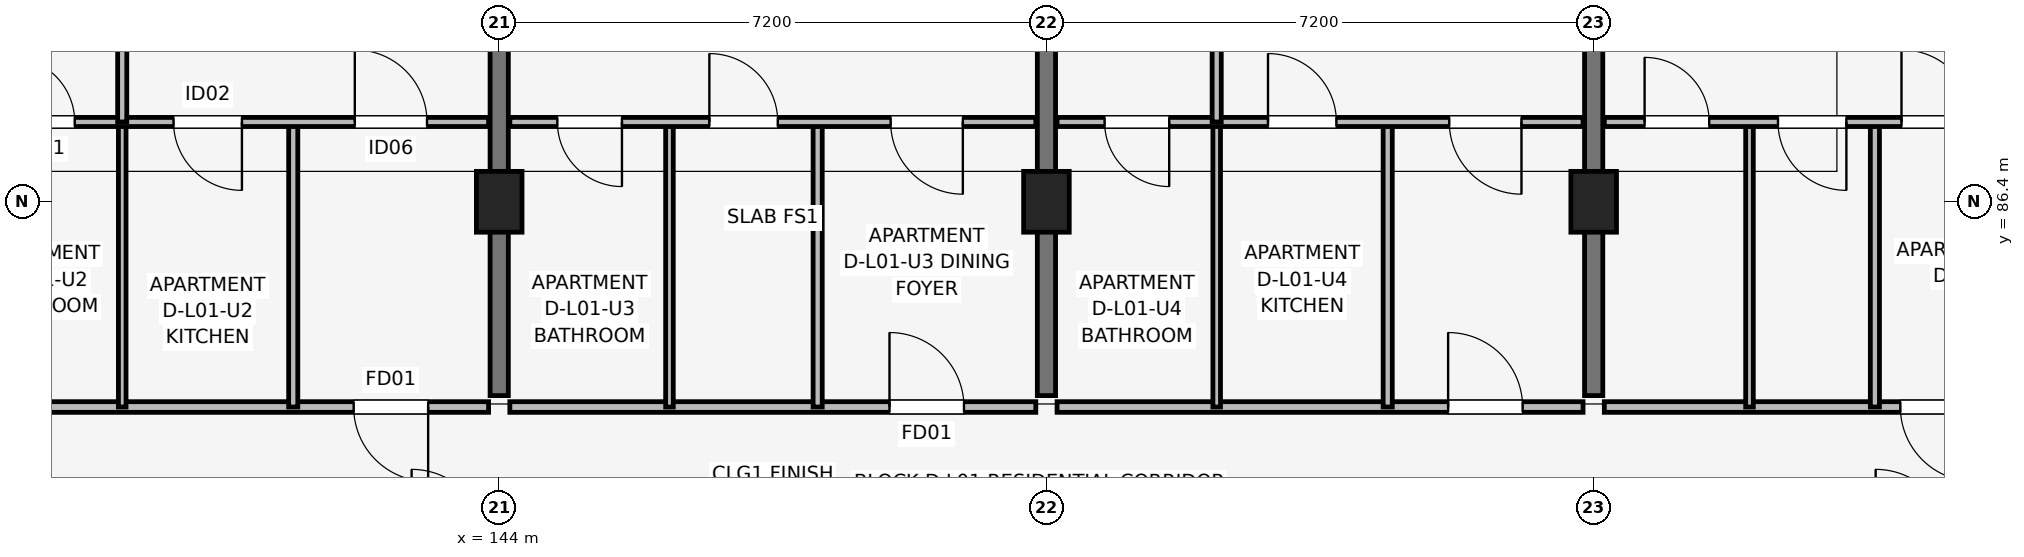
"""IFC4 building model, lengths in metres.
Left out: names, types, materials, properties, quantities, classifications, styles, units other than length and angle.
Written with IfcOpenShell. Run it as: python <this file> out.ifc"""

import sys

from ifc_helpers import new_model, si_unit, direction, frame, frame_2d, origin, origin_2d, place, context, subcontext, project, spatial, rectangle, extrude, element, fill, save


model = new_model("IFC4")
c1 = context("Model", 3, precision=1e-05, world=origin(), true_north=direction((0.0, 1.0)))
c2 = subcontext(c1, "Body", "Model", "MODEL_VIEW")
j1 = project(units=[si_unit("LENGTHUNIT", "METRE"), si_unit("PLANEANGLEUNIT", "RADIAN")], contexts=[c1])
p1 = place(None, origin())
s1 = spatial("IfcSite", under=j1, at=p1, CompositionType="ELEMENT")
p2 = place(p1, origin())
s2 = spatial("IfcBuilding", under=s1, at=p2, CompositionType="ELEMENT")
p3 = place(p2, frame((0.0, 0.0, 4.5)))
s3 = spatial("IfcBuildingStorey", under=s2, at=p3, CompositionType="ELEMENT", Elevation=4.5)
for number, where, z_axis, x_axis in (
    (1, (144.0, 86.4, 0.0), (0.0, 0.0, 1.0), (1.0, 0.0, 0.0)),
    (2, (151.2, 86.4, 0.0), (0.0, 0.0, 1.0), (1.0, 0.0, 0.0)),
    (3, (158.4, 86.4, 0.0), (0.0, 0.0, 1.0), (1.0, 0.0, 0.0)),
):
    element("IfcColumn", number, at=place(p3, frame(where, z_axis=z_axis, x_axis=x_axis)), inside=s3, PredefinedType="COLUMN", context=c2, shape_type="SweptSolid", body=[
        extrude(rectangle(XDim=0.6, YDim=0.8, at=origin_2d()), origin(), (0.0, 0.0, 1.0), 4.2),
    ])
for number, where, z_axis, x_axis in (
    (4, (144.0, 83.85, 0.0), (0.0, 0.0, 1.0), (0.0, 1.0, 0.0)),
    (5, (151.2, 83.85, 0.0), (0.0, 0.0, 1.0), (0.0, 1.0, 0.0)),
    (6, (158.4, 83.85, 0.0), (0.0, 0.0, 1.0), (0.0, 1.0, 0.0)),
):
    element("IfcWall", number, at=place(p3, frame(where, z_axis=z_axis, x_axis=x_axis)), inside=s3, PredefinedType="SHEAR", context=c2, shape_type="SweptSolid", body=[
        extrude(rectangle(XDim=9.4, YDim=0.24, at=frame_2d((4.7, 0.0))), origin(), (0.0, 0.0, 1.0), 4.2),
    ])
p4 = place(p3, frame((136.94, 83.7, 0.0), z_axis=(0.0, 0.0, 1.0), x_axis=(1.0, 0.0, 0.0)))
e7 = element("IfcWall", 7, at=p4, inside=s3, PredefinedType="PARTITIONING", context=c2, shape_type="SweptSolid", body=[
    extrude(rectangle(XDim=6.92, YDim=0.14, at=frame_2d((3.46, 0.0))), origin(), (0.0, 0.0, 1.0), 3.25),
])
p5 = place(p4, frame((6.125, 0.0, 0.0), z_axis=(0.0, 0.0, 1.0), x_axis=(-1.0, 0.0, 0.0)))
e8 = element("IfcOpeningElement", 8, at=p5, cuts=e7, PredefinedType="OPENING", context=c2, shape_type="SweptSolid", body=[
    extrude(rectangle(XDim=0.98, YDim=2.1, at=frame_2d((0.49, 1.05))), frame((0.0, 0.08, 0.0), z_axis=(0.0, -1.0, 0.0), x_axis=(1.0, 0.0, 0.0)), (0.0, 0.0, 1.0), 0.16),
])
p6 = place(p3, frame((139.04, 83.7, 0.0), z_axis=(0.0, 0.0, 1.0), x_axis=(0.0, 1.0, 0.0)))
e9 = element("IfcWall", 9, at=p6, inside=s3, PredefinedType="PARTITIONING", context=c2, shape_type="SweptSolid", body=[
    extrude(rectangle(XDim=3.75, YDim=0.1, at=frame_2d((1.875, 0.0))), origin(), (0.0, 0.0, 1.0), 3.25),
])
p7 = place(p3, frame((141.29, 83.7, 0.0), z_axis=(0.0, 0.0, 1.0), x_axis=(0.0, 1.0, 0.0)))
e10 = element("IfcWall", 10, at=p7, inside=s3, PredefinedType="PARTITIONING", context=c2, shape_type="SweptSolid", body=[
    extrude(rectangle(XDim=3.75, YDim=0.12, at=frame_2d((1.875, 0.0))), origin(), (0.0, 0.0, 1.0), 3.25),
])
p8 = place(p3, frame((136.94, 87.45, 0.0), z_axis=(0.0, 0.0, 1.0), x_axis=(1.0, 0.0, 0.0)))
e11 = element("IfcWall", 11, at=p8, inside=s3, PredefinedType="PARTITIONING", context=c2, shape_type="SweptSolid", body=[
    extrude(rectangle(XDim=6.92, YDim=0.12, at=frame_2d((3.46, 0.0))), origin(), (0.0, 0.0, 1.0), 3.25),
])
p9 = place(p8, frame((0.625, 0.0, 0.0)))
e12 = element("IfcOpeningElement", 12, at=p9, cuts=e11, PredefinedType="OPENING", context=c2, shape_type="SweptSolid", body=[
    extrude(rectangle(XDim=0.85, YDim=2.08, at=frame_2d((0.425, 1.04))), frame((0.0, 0.07, 0.0), z_axis=(0.0, -1.0, 0.0), x_axis=(1.0, 0.0, 0.0)), (0.0, 0.0, 1.0), 0.14),
])
p10 = place(p8, frame((3.675, 0.0, 0.0), z_axis=(0.0, 0.0, 1.0), x_axis=(-1.0, 0.0, 0.0)))
e13 = element("IfcOpeningElement", 13, at=p10, cuts=e11, PredefinedType="OPENING", context=c2, shape_type="SweptSolid", body=[
    extrude(rectangle(XDim=0.9, YDim=2.08, at=frame_2d((0.45, 1.04))), frame((0.0, 0.07, 0.0), z_axis=(0.0, -1.0, 0.0), x_axis=(1.0, 0.0, 0.0)), (0.0, 0.0, 1.0), 0.14),
])
p11 = place(p8, frame((5.16, 0.0, 0.0)))
e14 = element("IfcOpeningElement", 14, at=p11, cuts=e11, PredefinedType="OPENING", context=c2, shape_type="SweptSolid", body=[
    extrude(rectangle(XDim=0.95, YDim=2.08, at=frame_2d((0.475, 1.04))), frame((0.0, 0.07, 0.0), z_axis=(0.0, -1.0, 0.0), x_axis=(1.0, 0.0, 0.0)), (0.0, 0.0, 1.0), 0.14),
])
p12 = place(p3, frame((139.04, 87.45, 0.0), z_axis=(0.0, 0.0, 1.0), x_axis=(0.0, 1.0, 0.0)))
e15 = element("IfcWall", 15, at=p12, inside=s3, PredefinedType="PARTITIONING", context=c2, shape_type="SweptSolid", body=[
    extrude(rectangle(XDim=5.85, YDim=0.12, at=frame_2d((2.925, 0.0))), origin(), (0.0, 0.0, 1.0), 3.25),
])
p13 = place(p12, frame((3.375, 0.0, 0.0), z_axis=(0.0, 0.0, 1.0), x_axis=(-1.0, 0.0, 0.0)))
e16 = element("IfcOpeningElement", 16, at=p13, cuts=e15, PredefinedType="OPENING", context=c2, shape_type="SweptSolid", body=[
    extrude(rectangle(XDim=0.9, YDim=2.08, at=frame_2d((0.45, 1.04))), frame((0.0, 0.07, 0.0), z_axis=(0.0, -1.0, 0.0), x_axis=(1.0, 0.0, 0.0)), (0.0, 0.0, 1.0), 0.14),
])
p14 = place(p3, frame((144.14, 83.7, 0.0), z_axis=(0.0, 0.0, 1.0), x_axis=(1.0, 0.0, 0.0)))
e17 = element("IfcWall", 17, at=p14, inside=s3, PredefinedType="PARTITIONING", context=c2, shape_type="SweptSolid", body=[
    extrude(rectangle(XDim=6.92, YDim=0.14, at=frame_2d((3.46, 0.0))), origin(), (0.0, 0.0, 1.0), 3.25),
])
p15 = place(p14, frame((4.995, 0.0, 0.0)))
e18 = element("IfcOpeningElement", 18, at=p15, cuts=e17, PredefinedType="OPENING", context=c2, shape_type="SweptSolid", body=[
    extrude(rectangle(XDim=0.98, YDim=2.1, at=frame_2d((0.49, 1.05))), frame((0.0, 0.08, 0.0), z_axis=(0.0, -1.0, 0.0), x_axis=(1.0, 0.0, 0.0)), (0.0, 0.0, 1.0), 0.16),
])
p16 = place(p3, frame((146.24, 83.7, 0.0), z_axis=(0.0, 0.0, 1.0), x_axis=(0.0, 1.0, 0.0)))
e19 = element("IfcWall", 19, at=p16, inside=s3, PredefinedType="PARTITIONING", context=c2, shape_type="SweptSolid", body=[
    extrude(rectangle(XDim=3.75, YDim=0.1, at=frame_2d((1.875, 0.0))), origin(), (0.0, 0.0, 1.0), 3.25),
])
p17 = place(p3, frame((148.19, 83.7, 0.0), z_axis=(0.0, 0.0, 1.0), x_axis=(0.0, 1.0, 0.0)))
e20 = element("IfcWall", 20, at=p17, inside=s3, PredefinedType="PARTITIONING", context=c2, shape_type="SweptSolid", body=[
    extrude(rectangle(XDim=3.75, YDim=0.12, at=frame_2d((1.875, 0.0))), origin(), (0.0, 0.0, 1.0), 3.25),
])
p18 = place(p3, frame((144.14, 87.45, 0.0), z_axis=(0.0, 0.0, 1.0), x_axis=(1.0, 0.0, 0.0)))
e21 = element("IfcWall", 21, at=p18, inside=s3, PredefinedType="PARTITIONING", context=c2, shape_type="SweptSolid", body=[
    extrude(rectangle(XDim=6.92, YDim=0.12, at=frame_2d((3.46, 0.0))), origin(), (0.0, 0.0, 1.0), 3.25),
])
p19 = place(p18, frame((1.475, 0.0, 0.0), z_axis=(0.0, 0.0, 1.0), x_axis=(-1.0, 0.0, 0.0)))
e22 = element("IfcOpeningElement", 22, at=p19, cuts=e21, PredefinedType="OPENING", context=c2, shape_type="SweptSolid", body=[
    extrude(rectangle(XDim=0.85, YDim=2.08, at=frame_2d((0.425, 1.04))), frame((0.0, 0.07, 0.0), z_axis=(0.0, -1.0, 0.0), x_axis=(1.0, 0.0, 0.0)), (0.0, 0.0, 1.0), 0.14),
])
p20 = place(p18, frame((2.625, 0.0, 0.0)))
e23 = element("IfcOpeningElement", 23, at=p20, cuts=e21, PredefinedType="OPENING", context=c2, shape_type="SweptSolid", body=[
    extrude(rectangle(XDim=0.9, YDim=2.08, at=frame_2d((0.45, 1.04))), frame((0.0, 0.07, 0.0), z_axis=(0.0, -1.0, 0.0), x_axis=(1.0, 0.0, 0.0)), (0.0, 0.0, 1.0), 0.14),
])
p21 = place(p18, frame((5.96, 0.0, 0.0), z_axis=(0.0, 0.0, 1.0), x_axis=(-1.0, 0.0, 0.0)))
e24 = element("IfcOpeningElement", 24, at=p21, cuts=e21, PredefinedType="OPENING", context=c2, shape_type="SweptSolid", body=[
    extrude(rectangle(XDim=0.95, YDim=2.08, at=frame_2d((0.475, 1.04))), frame((0.0, 0.07, 0.0), z_axis=(0.0, -1.0, 0.0), x_axis=(1.0, 0.0, 0.0)), (0.0, 0.0, 1.0), 0.14),
])
p22 = place(p3, frame((151.34, 83.7, 0.0), z_axis=(0.0, 0.0, 1.0), x_axis=(1.0, 0.0, 0.0)))
e25 = element("IfcWall", 25, at=p22, inside=s3, PredefinedType="PARTITIONING", context=c2, shape_type="SweptSolid", body=[
    extrude(rectangle(XDim=6.92, YDim=0.14, at=frame_2d((3.46, 0.0))), origin(), (0.0, 0.0, 1.0), 3.25),
])
p23 = place(p22, frame((5.145, 0.0, 0.0)))
e26 = element("IfcOpeningElement", 26, at=p23, cuts=e25, PredefinedType="OPENING", context=c2, shape_type="SweptSolid", body=[
    extrude(rectangle(XDim=0.98, YDim=2.1, at=frame_2d((0.49, 1.05))), frame((0.0, 0.08, 0.0), z_axis=(0.0, -1.0, 0.0), x_axis=(1.0, 0.0, 0.0)), (0.0, 0.0, 1.0), 0.16),
])
p24 = place(p3, frame((153.44, 83.7, 0.0), z_axis=(0.0, 0.0, 1.0), x_axis=(0.0, 1.0, 0.0)))
e27 = element("IfcWall", 27, at=p24, inside=s3, PredefinedType="PARTITIONING", context=c2, shape_type="SweptSolid", body=[
    extrude(rectangle(XDim=3.75, YDim=0.1, at=frame_2d((1.875, 0.0))), origin(), (0.0, 0.0, 1.0), 3.25),
])
p25 = place(p3, frame((155.69, 83.7, 0.0), z_axis=(0.0, 0.0, 1.0), x_axis=(0.0, 1.0, 0.0)))
e28 = element("IfcWall", 28, at=p25, inside=s3, PredefinedType="PARTITIONING", context=c2, shape_type="SweptSolid", body=[
    extrude(rectangle(XDim=3.75, YDim=0.12, at=frame_2d((1.875, 0.0))), origin(), (0.0, 0.0, 1.0), 3.25),
])
p26 = place(p3, frame((151.34, 87.45, 0.0), z_axis=(0.0, 0.0, 1.0), x_axis=(1.0, 0.0, 0.0)))
e29 = element("IfcWall", 29, at=p26, inside=s3, PredefinedType="PARTITIONING", context=c2, shape_type="SweptSolid", body=[
    extrude(rectangle(XDim=6.92, YDim=0.12, at=frame_2d((3.46, 0.0))), origin(), (0.0, 0.0, 1.0), 3.25),
])
p27 = place(p26, frame((1.475, 0.0, 0.0), z_axis=(0.0, 0.0, 1.0), x_axis=(-1.0, 0.0, 0.0)))
e30 = element("IfcOpeningElement", 30, at=p27, cuts=e29, PredefinedType="OPENING", context=c2, shape_type="SweptSolid", body=[
    extrude(rectangle(XDim=0.85, YDim=2.08, at=frame_2d((0.425, 1.04))), frame((0.0, 0.07, 0.0), z_axis=(0.0, -1.0, 0.0), x_axis=(1.0, 0.0, 0.0)), (0.0, 0.0, 1.0), 0.14),
])
p28 = place(p26, frame((2.775, 0.0, 0.0)))
e31 = element("IfcOpeningElement", 31, at=p28, cuts=e29, PredefinedType="OPENING", context=c2, shape_type="SweptSolid", body=[
    extrude(rectangle(XDim=0.9, YDim=2.08, at=frame_2d((0.45, 1.04))), frame((0.0, 0.07, 0.0), z_axis=(0.0, -1.0, 0.0), x_axis=(1.0, 0.0, 0.0)), (0.0, 0.0, 1.0), 0.14),
])
p29 = place(p26, frame((6.11, 0.0, 0.0), z_axis=(0.0, 0.0, 1.0), x_axis=(-1.0, 0.0, 0.0)))
e32 = element("IfcOpeningElement", 32, at=p29, cuts=e29, PredefinedType="OPENING", context=c2, shape_type="SweptSolid", body=[
    extrude(rectangle(XDim=0.95, YDim=2.08, at=frame_2d((0.475, 1.04))), frame((0.0, 0.07, 0.0), z_axis=(0.0, -1.0, 0.0), x_axis=(1.0, 0.0, 0.0)), (0.0, 0.0, 1.0), 0.14),
])
p30 = place(p3, frame((153.44, 87.45, 0.0), z_axis=(0.0, 0.0, 1.0), x_axis=(0.0, 1.0, 0.0)))
e33 = element("IfcWall", 33, at=p30, inside=s3, PredefinedType="PARTITIONING", context=c2, shape_type="SweptSolid", body=[
    extrude(rectangle(XDim=5.85, YDim=0.12, at=frame_2d((2.925, 0.0))), origin(), (0.0, 0.0, 1.0), 3.25),
])
p31 = place(p30, frame((2.475, 0.0, 0.0)))
e34 = element("IfcOpeningElement", 34, at=p31, cuts=e33, PredefinedType="OPENING", context=c2, shape_type="SweptSolid", body=[
    extrude(rectangle(XDim=0.9, YDim=2.08, at=frame_2d((0.45, 1.04))), frame((0.0, 0.07, 0.0), z_axis=(0.0, -1.0, 0.0), x_axis=(1.0, 0.0, 0.0)), (0.0, 0.0, 1.0), 0.14),
])
p32 = place(p3, frame((158.54, 83.7, 0.0), z_axis=(0.0, 0.0, 1.0), x_axis=(1.0, 0.0, 0.0)))
e35 = element("IfcWall", 35, at=p32, inside=s3, PredefinedType="PARTITIONING", context=c2, shape_type="SweptSolid", body=[
    extrude(rectangle(XDim=6.92, YDim=0.14, at=frame_2d((3.46, 0.0))), origin(), (0.0, 0.0, 1.0), 3.25),
])
p33 = place(p32, frame((4.875, 0.0, 0.0), z_axis=(0.0, 0.0, 1.0), x_axis=(-1.0, 0.0, 0.0)))
e36 = element("IfcOpeningElement", 36, at=p33, cuts=e35, PredefinedType="OPENING", context=c2, shape_type="SweptSolid", body=[
    extrude(rectangle(XDim=0.98, YDim=2.1, at=frame_2d((0.49, 1.05))), frame((0.0, 0.08, 0.0), z_axis=(0.0, -1.0, 0.0), x_axis=(1.0, 0.0, 0.0)), (0.0, 0.0, 1.0), 0.16),
])
p34 = place(p3, frame((160.45, 83.7, 0.0), z_axis=(0.0, 0.0, 1.0), x_axis=(0.0, 1.0, 0.0)))
e37 = element("IfcWall", 37, at=p34, inside=s3, PredefinedType="PARTITIONING", context=c2, shape_type="SweptSolid", body=[
    extrude(rectangle(XDim=3.75, YDim=0.1, at=frame_2d((1.875, 0.0))), origin(), (0.0, 0.0, 1.0), 3.25),
])
p35 = place(p3, frame((162.1, 83.7, 0.0), z_axis=(0.0, 0.0, 1.0), x_axis=(0.0, 1.0, 0.0)))
e38 = element("IfcWall", 38, at=p35, inside=s3, PredefinedType="PARTITIONING", context=c2, shape_type="SweptSolid", body=[
    extrude(rectangle(XDim=3.75, YDim=0.12, at=frame_2d((1.875, 0.0))), origin(), (0.0, 0.0, 1.0), 3.25),
])
p36 = place(p3, frame((158.54, 87.45, 0.0), z_axis=(0.0, 0.0, 1.0), x_axis=(1.0, 0.0, 0.0)))
e39 = element("IfcWall", 39, at=p36, inside=s3, PredefinedType="PARTITIONING", context=c2, shape_type="SweptSolid", body=[
    extrude(rectangle(XDim=6.92, YDim=0.12, at=frame_2d((3.46, 0.0))), origin(), (0.0, 0.0, 1.0), 3.25),
])
p37 = place(p36, frame((0.53, 0.0, 0.0)))
e40 = element("IfcOpeningElement", 40, at=p37, cuts=e39, PredefinedType="OPENING", context=c2, shape_type="SweptSolid", body=[
    extrude(rectangle(XDim=0.85, YDim=2.08, at=frame_2d((0.425, 1.04))), frame((0.0, 0.07, 0.0), z_axis=(0.0, -1.0, 0.0), x_axis=(1.0, 0.0, 0.0)), (0.0, 0.0, 1.0), 0.14),
])
p38 = place(p36, frame((3.185, 0.0, 0.0), z_axis=(0.0, 0.0, 1.0), x_axis=(-1.0, 0.0, 0.0)))
e41 = element("IfcOpeningElement", 41, at=p38, cuts=e39, PredefinedType="OPENING", context=c2, shape_type="SweptSolid", body=[
    extrude(rectangle(XDim=0.9, YDim=2.08, at=frame_2d((0.45, 1.04))), frame((0.0, 0.07, 0.0), z_axis=(0.0, -1.0, 0.0), x_axis=(1.0, 0.0, 0.0)), (0.0, 0.0, 1.0), 0.14),
])
p39 = place(p36, frame((3.91, 0.0, 0.0)))
e42 = element("IfcOpeningElement", 42, at=p39, cuts=e39, PredefinedType="OPENING", context=c2, shape_type="SweptSolid", body=[
    extrude(rectangle(XDim=0.95, YDim=2.08, at=frame_2d((0.475, 1.04))), frame((0.0, 0.07, 0.0), z_axis=(0.0, -1.0, 0.0), x_axis=(1.0, 0.0, 0.0)), (0.0, 0.0, 1.0), 0.14),
])
p40 = place(p5, origin())
e43 = element("IfcDoor", 43, at=p40, inside=s3, OperationType="SINGLE_SWING_RIGHT", PredefinedType="DOOR", context=c2, shape_type="SweptSolid", body=[
    extrude(rectangle(XDim=0.98, YDim=2.1, at=frame_2d((0.49, 1.05))), frame((0.0, 0.025, 0.0), z_axis=(0.0, -1.0, 0.0), x_axis=(1.0, 0.0, 0.0)), (0.0, 0.0, 1.0), 0.05),
])
fill(e8, e43)
p41 = place(p9, origin())
e44 = element("IfcDoor", 44, at=p41, inside=s3, OperationType="SINGLE_SWING_LEFT", PredefinedType="DOOR", context=c2, shape_type="SweptSolid", body=[
    extrude(rectangle(XDim=0.85, YDim=2.08, at=frame_2d((0.425, 1.04))), frame((0.0, 0.025, 0.0), z_axis=(0.0, -1.0, 0.0), x_axis=(1.0, 0.0, 0.0)), (0.0, 0.0, 1.0), 0.05),
])
fill(e12, e44)
p42 = place(p10, origin())
e45 = element("IfcDoor", 45, at=p42, inside=s3, OperationType="SINGLE_SWING_RIGHT", PredefinedType="DOOR", context=c2, shape_type="SweptSolid", body=[
    extrude(rectangle(XDim=0.9, YDim=2.08, at=frame_2d((0.45, 1.04))), frame((0.0, 0.025, 0.0), z_axis=(0.0, -1.0, 0.0), x_axis=(1.0, 0.0, 0.0)), (0.0, 0.0, 1.0), 0.05),
])
fill(e13, e45)
p43 = place(p11, origin())
e46 = element("IfcDoor", 46, at=p43, inside=s3, OperationType="SINGLE_SWING_LEFT", PredefinedType="DOOR", context=c2, shape_type="SweptSolid", body=[
    extrude(rectangle(XDim=0.95, YDim=2.08, at=frame_2d((0.475, 1.04))), frame((0.0, 0.025, 0.0), z_axis=(0.0, -1.0, 0.0), x_axis=(1.0, 0.0, 0.0)), (0.0, 0.0, 1.0), 0.05),
])
fill(e14, e46)
p44 = place(p15, origin())
e47 = element("IfcDoor", 47, at=p44, inside=s3, OperationType="SINGLE_SWING_LEFT", PredefinedType="DOOR", context=c2, shape_type="SweptSolid", body=[
    extrude(rectangle(XDim=0.98, YDim=2.1, at=frame_2d((0.49, 1.05))), frame((0.0, 0.025, 0.0), z_axis=(0.0, -1.0, 0.0), x_axis=(1.0, 0.0, 0.0)), (0.0, 0.0, 1.0), 0.05),
])
fill(e18, e47)
p45 = place(p19, origin())
e48 = element("IfcDoor", 48, at=p45, inside=s3, OperationType="SINGLE_SWING_RIGHT", PredefinedType="DOOR", context=c2, shape_type="SweptSolid", body=[
    extrude(rectangle(XDim=0.85, YDim=2.08, at=frame_2d((0.425, 1.04))), frame((0.0, 0.025, 0.0), z_axis=(0.0, -1.0, 0.0), x_axis=(1.0, 0.0, 0.0)), (0.0, 0.0, 1.0), 0.05),
])
fill(e22, e48)
p46 = place(p20, origin())
e49 = element("IfcDoor", 49, at=p46, inside=s3, OperationType="SINGLE_SWING_LEFT", PredefinedType="DOOR", context=c2, shape_type="SweptSolid", body=[
    extrude(rectangle(XDim=0.9, YDim=2.08, at=frame_2d((0.45, 1.04))), frame((0.0, 0.025, 0.0), z_axis=(0.0, -1.0, 0.0), x_axis=(1.0, 0.0, 0.0)), (0.0, 0.0, 1.0), 0.05),
])
fill(e23, e49)
p47 = place(p21, origin())
e50 = element("IfcDoor", 50, at=p47, inside=s3, OperationType="SINGLE_SWING_RIGHT", PredefinedType="DOOR", context=c2, shape_type="SweptSolid", body=[
    extrude(rectangle(XDim=0.95, YDim=2.08, at=frame_2d((0.475, 1.04))), frame((0.0, 0.025, 0.0), z_axis=(0.0, -1.0, 0.0), x_axis=(1.0, 0.0, 0.0)), (0.0, 0.0, 1.0), 0.05),
])
fill(e24, e50)
p48 = place(p23, origin())
e51 = element("IfcDoor", 51, at=p48, inside=s3, OperationType="SINGLE_SWING_LEFT", PredefinedType="DOOR", context=c2, shape_type="SweptSolid", body=[
    extrude(rectangle(XDim=0.98, YDim=2.1, at=frame_2d((0.49, 1.05))), frame((0.0, 0.025, 0.0), z_axis=(0.0, -1.0, 0.0), x_axis=(1.0, 0.0, 0.0)), (0.0, 0.0, 1.0), 0.05),
])
fill(e26, e51)
p49 = place(p27, origin())
e52 = element("IfcDoor", 52, at=p49, inside=s3, OperationType="SINGLE_SWING_RIGHT", PredefinedType="DOOR", context=c2, shape_type="SweptSolid", body=[
    extrude(rectangle(XDim=0.85, YDim=2.08, at=frame_2d((0.425, 1.04))), frame((0.0, 0.025, 0.0), z_axis=(0.0, -1.0, 0.0), x_axis=(1.0, 0.0, 0.0)), (0.0, 0.0, 1.0), 0.05),
])
fill(e30, e52)
p50 = place(p28, origin())
e53 = element("IfcDoor", 53, at=p50, inside=s3, OperationType="SINGLE_SWING_LEFT", PredefinedType="DOOR", context=c2, shape_type="SweptSolid", body=[
    extrude(rectangle(XDim=0.9, YDim=2.08, at=frame_2d((0.45, 1.04))), frame((0.0, 0.025, 0.0), z_axis=(0.0, -1.0, 0.0), x_axis=(1.0, 0.0, 0.0)), (0.0, 0.0, 1.0), 0.05),
])
fill(e31, e53)
p51 = place(p29, origin())
e54 = element("IfcDoor", 54, at=p51, inside=s3, OperationType="SINGLE_SWING_RIGHT", PredefinedType="DOOR", context=c2, shape_type="SweptSolid", body=[
    extrude(rectangle(XDim=0.95, YDim=2.08, at=frame_2d((0.475, 1.04))), frame((0.0, 0.025, 0.0), z_axis=(0.0, -1.0, 0.0), x_axis=(1.0, 0.0, 0.0)), (0.0, 0.0, 1.0), 0.05),
])
fill(e32, e54)
p52 = place(p33, origin())
e55 = element("IfcDoor", 55, at=p52, inside=s3, OperationType="SINGLE_SWING_RIGHT", PredefinedType="DOOR", context=c2, shape_type="SweptSolid", body=[
    extrude(rectangle(XDim=0.98, YDim=2.1, at=frame_2d((0.49, 1.05))), frame((0.0, 0.025, 0.0), z_axis=(0.0, -1.0, 0.0), x_axis=(1.0, 0.0, 0.0)), (0.0, 0.0, 1.0), 0.05),
])
fill(e36, e55)
p53 = place(p37, origin())
e56 = element("IfcDoor", 56, at=p53, inside=s3, OperationType="SINGLE_SWING_LEFT", PredefinedType="DOOR", context=c2, shape_type="SweptSolid", body=[
    extrude(rectangle(XDim=0.85, YDim=2.08, at=frame_2d((0.425, 1.04))), frame((0.0, 0.025, 0.0), z_axis=(0.0, -1.0, 0.0), x_axis=(1.0, 0.0, 0.0)), (0.0, 0.0, 1.0), 0.05),
])
fill(e40, e56)
p54 = place(p38, origin())
e57 = element("IfcDoor", 57, at=p54, inside=s3, OperationType="SINGLE_SWING_RIGHT", PredefinedType="DOOR", context=c2, shape_type="SweptSolid", body=[
    extrude(rectangle(XDim=0.9, YDim=2.08, at=frame_2d((0.45, 1.04))), frame((0.0, 0.025, 0.0), z_axis=(0.0, -1.0, 0.0), x_axis=(1.0, 0.0, 0.0)), (0.0, 0.0, 1.0), 0.05),
])
fill(e41, e57)
p55 = place(p39, origin())
e58 = element("IfcDoor", 58, at=p55, inside=s3, OperationType="SINGLE_SWING_LEFT", PredefinedType="DOOR", context=c2, shape_type="SweptSolid", body=[
    extrude(rectangle(XDim=0.95, YDim=2.08, at=frame_2d((0.475, 1.04))), frame((0.0, 0.025, 0.0), z_axis=(0.0, -1.0, 0.0), x_axis=(1.0, 0.0, 0.0)), (0.0, 0.0, 1.0), 0.05),
])
fill(e42, e58)
save(model, sys.argv[1])
